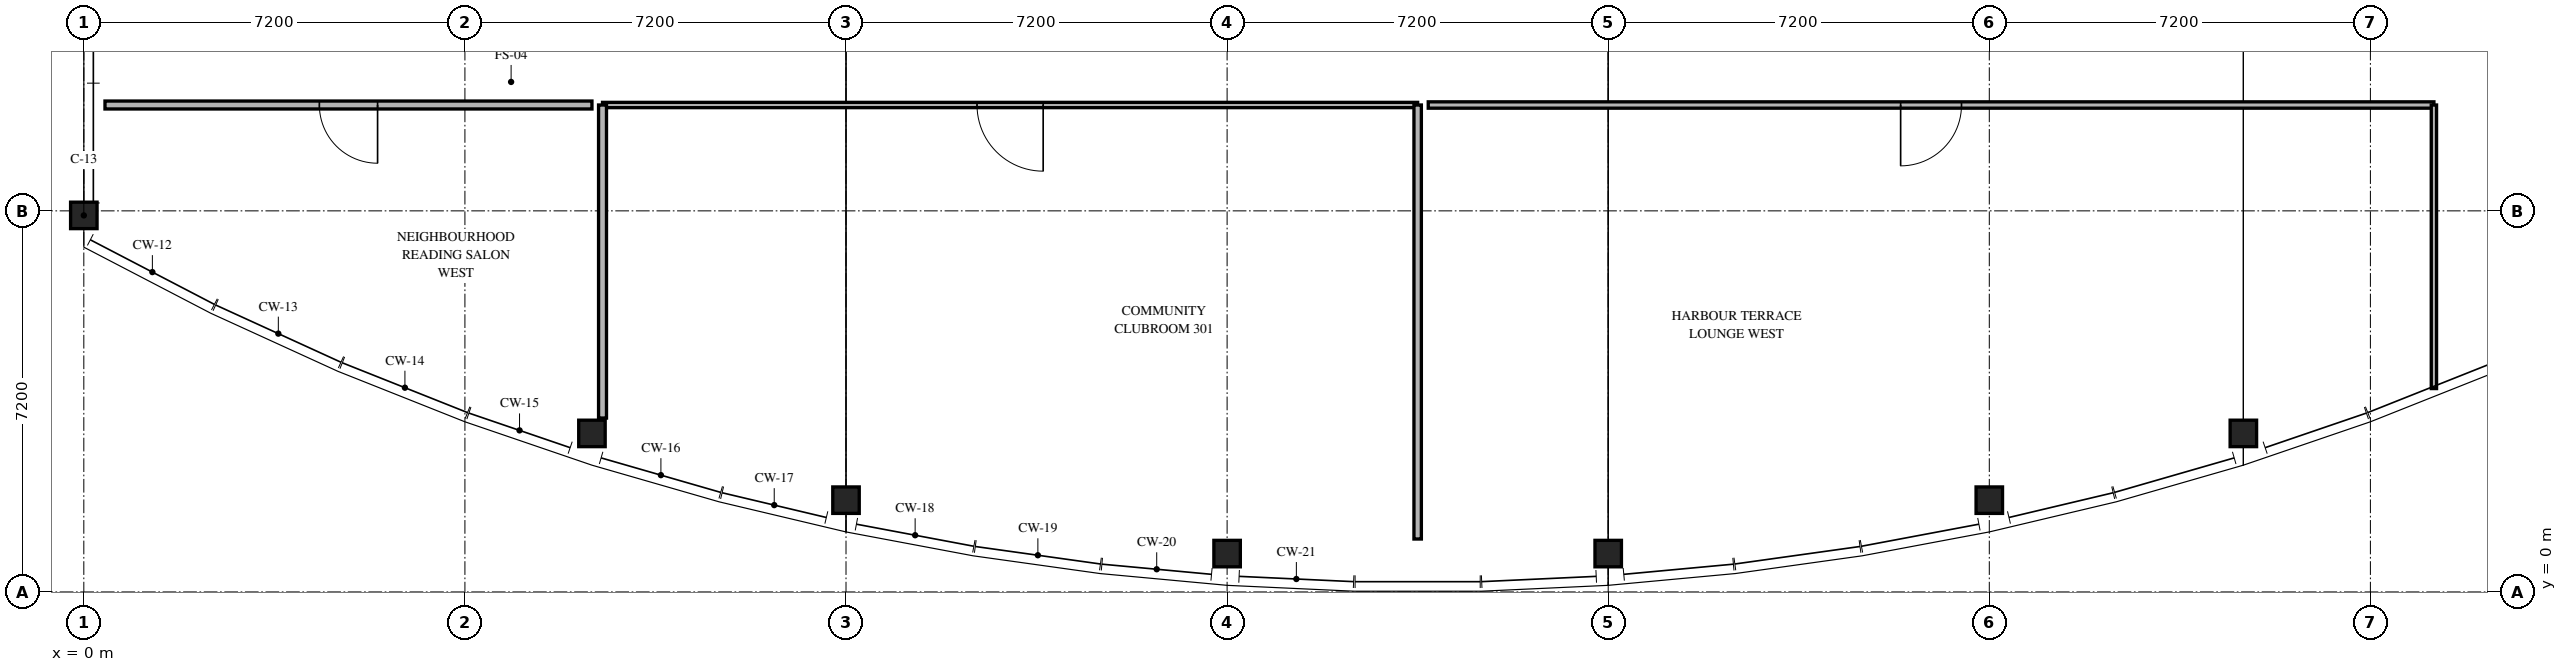
"""IFC4 building model, lengths in metres.
Left out: names, types, materials, properties, quantities, classifications, styles, units other than length and angle.
Written with IfcOpenShell. Run it as: python <this file> out.ifc"""

import sys

from ifc_helpers import new_model, si_unit, direction, frame, frame_2d, origin, origin_2d, place, context, subcontext, project, spatial, rectangle, circle, extrude, element, fill, save


model = new_model("IFC4")
c1 = context("Model", 3, precision=1e-05, world=origin(), true_north=direction((0.0, 1.0)))
c2 = subcontext(c1, "Body", "Model", "MODEL_VIEW")
j1 = project(units=[si_unit("LENGTHUNIT", "METRE"), si_unit("PLANEANGLEUNIT", "RADIAN")], contexts=[c1])
p1 = place(None, origin())
s1 = spatial("IfcSite", under=j1, at=p1, CompositionType="ELEMENT")
p2 = place(p1, origin())
s2 = spatial("IfcBuilding", under=s1, at=p2, CompositionType="ELEMENT")
p3 = place(p2, frame((0.0, 0.0, 12.9)))
s3 = spatial("IfcBuildingStorey", under=s2, at=p3, CompositionType="ELEMENT", Elevation=12.9)
for number, where, z_axis, x_axis in (
    (1, (0.0, 7.114, 0.0), (0.0, 0.0, 1.0), (1.0, 0.0, 0.0)),
    (2, (9.6, 2.995, 0.0), (0.0, 0.0, 1.0), (1.0, 0.0, 0.0)),
    (3, (14.4, 1.734, 0.0), (0.0, 0.0, 1.0), (1.0, 0.0, 0.0)),
    (4, (21.6, 0.725, 0.0), (0.0, 0.0, 1.0), (1.0, 0.0, 0.0)),
    (5, (28.8, 0.725, 0.0), (0.0, 0.0, 1.0), (1.0, 0.0, 0.0)),
    (6, (36.0, 1.734, 0.0), (0.0, 0.0, 1.0), (1.0, 0.0, 0.0)),
    (7, (40.8, 2.995, 0.0), (0.0, 0.0, 1.0), (1.0, 0.0, 0.0)),
):
    element("IfcColumn", number, at=place(p3, frame(where, z_axis=z_axis, x_axis=x_axis)), inside=s3, PredefinedType="COLUMN", context=c2, shape_type="SweptSolid", body=[
        extrude(circle(Radius=0.25, at=origin_2d()), origin(), (0.0, 0.0, 1.0), 3.9),
    ])
p4 = place(p3, frame((25.2, 9.2, 0.0), z_axis=(0.0, 0.0, 1.0), x_axis=(-1.0, 0.0, 0.0)))
e8 = element("IfcWall", 8, at=p4, inside=s3, PredefinedType="PARTITIONING", context=c2, shape_type="SweptSolid", body=[
    extrude(rectangle(XDim=15.4, YDim=0.1, at=frame_2d((7.7, 0.0))), origin(), (0.0, 0.0, 1.0), 3.66),
])
p5 = place(p4, frame((7.075, 0.0, 0.0)))
e9 = element("IfcOpeningElement", 9, at=p5, cuts=e8, PredefinedType="OPENING", context=c2, shape_type="SweptSolid", body=[
    extrude(rectangle(XDim=1.25, YDim=2.2, at=frame_2d((0.625, 1.1))), frame((0.0, 0.06, 0.0), z_axis=(0.0, -1.0, 0.0), x_axis=(1.0, 0.0, 0.0)), (0.0, 0.0, 1.0), 0.12),
])
p6 = place(p3, frame((9.8, 9.2, 0.0), z_axis=(0.0, 0.0, 1.0), x_axis=(0.0, -1.0, 0.0)))
e10 = element("IfcWall", 10, at=p6, inside=s3, PredefinedType="PARTITIONING", context=c2, shape_type="SweptSolid", body=[
    extrude(rectangle(XDim=5.915, YDim=0.15, at=frame_2d((2.958, 0.0))), origin(), (0.0, 0.0, 1.0), 3.06),
])
p7 = place(p3, frame((25.2, 1.0, 0.0), z_axis=(0.0, 0.0, 1.0), x_axis=(0.0, 1.0, 0.0)))
e11 = element("IfcWall", 11, at=p7, inside=s3, PredefinedType="PARTITIONING", context=c2, shape_type="SweptSolid", body=[
    extrude(rectangle(XDim=8.2, YDim=0.14, at=frame_2d((4.1, 0.0))), origin(), (0.0, 0.0, 1.0), 3.66),
])
p8 = place(p3, frame((44.4, 9.2, 0.0), z_axis=(0.0, 0.0, 1.0), x_axis=(-1.0, 0.0, 0.0)))
e12 = element("IfcWall", 12, at=p8, inside=s3, PredefinedType="PARTITIONING", context=c2, shape_type="SweptSolid", body=[
    extrude(rectangle(XDim=19.0, YDim=0.12, at=frame_2d((9.5, 0.0))), origin(), (0.0, 0.0, 1.0), 3.66),
])
p9 = place(p8, frame((8.925, 0.0, 0.0)))
e13 = element("IfcOpeningElement", 13, at=p9, cuts=e12, PredefinedType="OPENING", context=c2, shape_type="SweptSolid", body=[
    extrude(rectangle(XDim=1.15, YDim=2.15, at=frame_2d((0.575, 1.075))), frame((0.0, 0.07, 0.0), z_axis=(0.0, -1.0, 0.0), x_axis=(1.0, 0.0, 0.0)), (0.0, 0.0, 1.0), 0.14),
])
p10 = place(p3, frame((44.4, 3.842, 0.0), z_axis=(0.0, 0.0, 1.0), x_axis=(0.0, 1.0, 0.0)))
e14 = element("IfcWall", 14, at=p10, inside=s3, PredefinedType="PARTITIONING", context=c2, shape_type="SweptSolid", body=[
    extrude(rectangle(XDim=5.358, YDim=0.1, at=frame_2d((2.679, 0.0))), origin(), (0.0, 0.0, 1.0), 3.06),
])
p11 = place(p3, frame((9.6, 9.2, 0.0), z_axis=(0.0, 0.0, 1.0), x_axis=(-1.0, 0.0, 0.0)))
e15 = element("IfcWall", 15, at=p11, inside=s3, PredefinedType="PARTITIONING", context=c2, shape_type="SweptSolid", body=[
    extrude(rectangle(XDim=9.2, YDim=0.15, at=frame_2d((4.6, 0.0))), origin(), (0.0, 0.0, 1.0), 3.66),
])
p12 = place(p11, frame((4.05, 0.0, 0.0)))
e16 = element("IfcOpeningElement", 16, at=p12, cuts=e15, PredefinedType="OPENING", context=c2, shape_type="SweptSolid", body=[
    extrude(rectangle(XDim=1.1, YDim=2.15, at=frame_2d((0.55, 1.075))), frame((0.0, 0.085, 0.0), z_axis=(0.0, -1.0, 0.0), x_axis=(1.0, 0.0, 0.0)), (0.0, 0.0, 1.0), 0.17),
])
p13 = place(p5, origin())
e17 = element("IfcDoor", 17, at=p13, inside=s3, OperationType="SINGLE_SWING_LEFT", PredefinedType="DOOR", context=c2, shape_type="SweptSolid", body=[
    extrude(rectangle(XDim=1.25, YDim=2.2, at=frame_2d((0.625, 1.1))), frame((0.0, 0.025, 0.0), z_axis=(0.0, -1.0, 0.0), x_axis=(1.0, 0.0, 0.0)), (0.0, 0.0, 1.0), 0.05),
])
fill(e9, e17)
p14 = place(p9, origin())
e18 = element("IfcDoor", 18, at=p14, inside=s3, OperationType="SINGLE_SWING_RIGHT", PredefinedType="DOOR", context=c2, shape_type="SweptSolid", body=[
    extrude(rectangle(XDim=1.15, YDim=2.15, at=frame_2d((0.575, 1.075))), frame((0.0, 0.025, 0.0), z_axis=(0.0, -1.0, 0.0), x_axis=(1.0, 0.0, 0.0)), (0.0, 0.0, 1.0), 0.05),
])
fill(e13, e18)
p15 = place(p12, origin())
e19 = element("IfcDoor", 19, at=p15, inside=s3, OperationType="SINGLE_SWING_LEFT", PredefinedType="DOOR", context=c2, shape_type="SweptSolid", body=[
    extrude(rectangle(XDim=1.1, YDim=2.15, at=frame_2d((0.55, 1.075))), frame((0.0, 0.025, 0.0), z_axis=(0.0, -1.0, 0.0), x_axis=(1.0, 0.0, 0.0)), (0.0, 0.0, 1.0), 0.05),
])
fill(e16, e19)
save(model, sys.argv[1])
